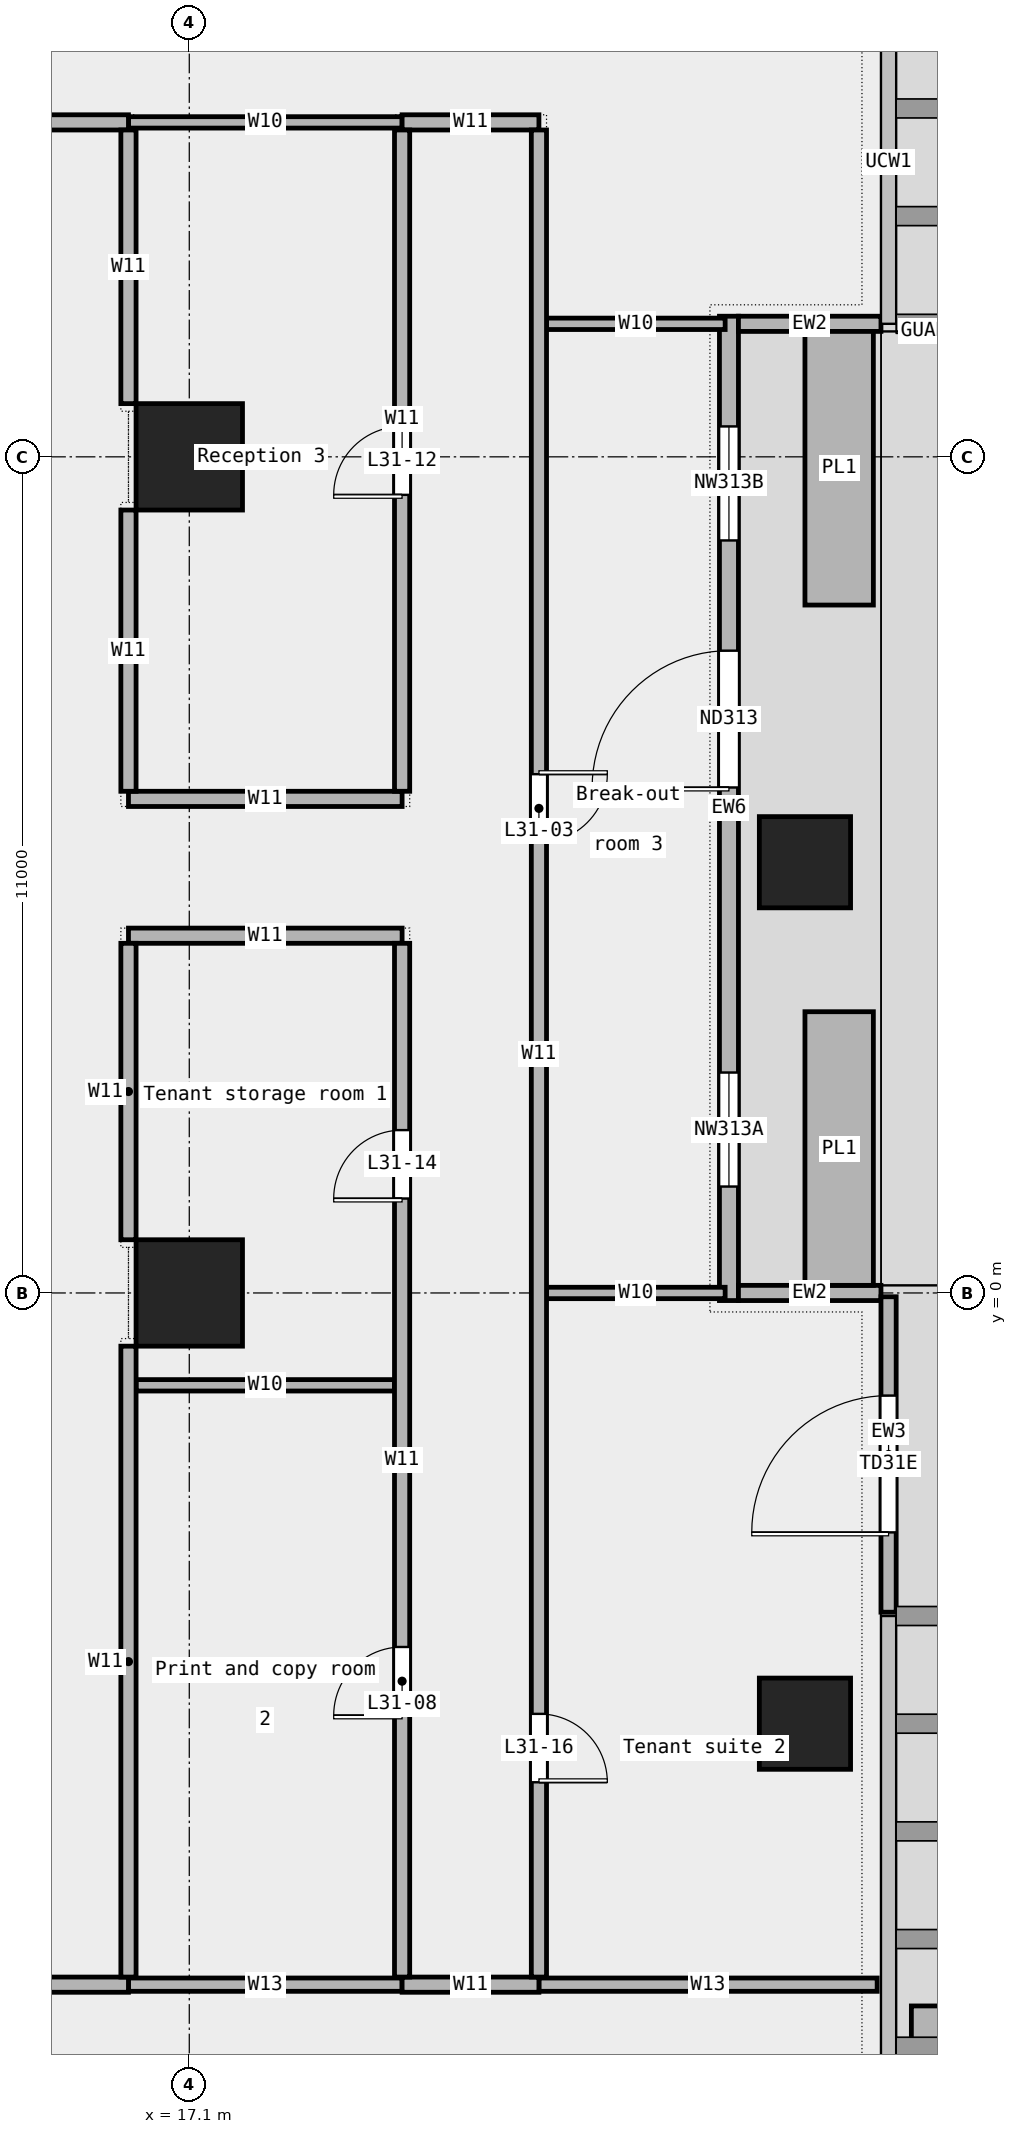
"""IFC4 building model, lengths in metres.
Left out: names, types, materials, properties, quantities, classifications, styles, units other than length and angle.
Written with IfcOpenShell. Run it as: python <this file> out.ifc"""

import sys

from ifc_helpers import new_model, si_unit, direction, frame, frame_2d, origin, origin_2d, place, context, subcontext, project, spatial, rectangle, extrude, element, fill, save


model = new_model("IFC4")
c1 = context("Model", 3, precision=1e-05, world=origin(), true_north=direction((0.0, 1.0)))
c2 = subcontext(c1, "Body", "Model", "MODEL_VIEW")
j1 = project(units=[si_unit("LENGTHUNIT", "METRE"), si_unit("PLANEANGLEUNIT", "RADIAN")], contexts=[c1])
p1 = place(None, origin())
s1 = spatial("IfcSite", under=j1, at=p1, CompositionType="ELEMENT")
p2 = place(p1, origin())
s2 = spatial("IfcBuilding", under=s1, at=p2, CompositionType="ELEMENT")
p3 = place(p2, frame((0.0, 0.0, 157.0)))
s3 = spatial("IfcBuildingStorey", under=s2, at=p3, CompositionType="ELEMENT", Elevation=157.0)
for number, where, z_axis, x_axis in (
    (1, (25.2, -5.667, 0.0), (0.0, 0.0, 1.0), (1.0, 0.0, 0.0)),
    (2, (25.2, 5.667, 0.0), (0.0, 0.0, 1.0), (1.0, 0.0, 0.0)),
):
    element("IfcColumn", number, at=place(p3, frame(where, z_axis=z_axis, x_axis=x_axis)), inside=s3, PredefinedType="COLUMN", context=c2, shape_type="SweptSolid", body=[
        extrude(rectangle(XDim=1.2, YDim=1.2, at=origin_2d()), origin(), (0.0, 0.0, 1.0), 3.6),
    ])
for number, where, z_axis, x_axis in (
    (3, (17.1, 0.0, 0.0), (0.0, 0.0, 1.0), (1.0, 0.0, 0.0)),
    (4, (17.1, 11.0, 0.0), (0.0, 0.0, 1.0), (1.0, 0.0, 0.0)),
):
    element("IfcColumn", number, at=place(p3, frame(where, z_axis=z_axis, x_axis=x_axis)), inside=s3, PredefinedType="COLUMN", context=c2, shape_type="SweptSolid", body=[
        extrude(rectangle(XDim=1.4, YDim=1.4, at=origin_2d()), origin(), (0.0, 0.0, 1.0), 3.6),
    ])
p4 = place(p3, frame((24.2, -0.1, 0.0), z_axis=(0.0, 0.0, 1.0), x_axis=(0.0, 1.0, 0.0)))
e5 = element("IfcWall", 5, at=p4, inside=s3, PredefinedType="STANDARD", context=c2, shape_type="SweptSolid", body=[
    extrude(rectangle(XDim=12.95, YDim=0.25, at=frame_2d((6.475, 0.0))), origin(), (0.0, 0.0, 1.0), 3.6),
])
p5 = place(p4, frame((1.5, 0.0, 0.45)))
e6 = element("IfcOpeningElement", 6, at=p5, cuts=e5, PredefinedType="OPENING", context=c2, shape_type="SweptSolid", body=[
    extrude(rectangle(XDim=1.5, YDim=2.4, at=frame_2d((0.75, 1.2))), frame((0.0, 0.137, 0.0), z_axis=(0.0, -1.0, 0.0), x_axis=(1.0, 0.0, 0.0)), (0.0, 0.0, 1.0), 0.274),
])
p6 = place(p4, frame((6.75, 0.0, 0.0)))
e7 = element("IfcOpeningElement", 7, at=p6, cuts=e5, PredefinedType="OPENING", context=c2, shape_type="SweptSolid", body=[
    extrude(rectangle(XDim=1.8, YDim=2.4, at=frame_2d((0.9, 1.2))), frame((0.0, 0.137, 0.0), z_axis=(0.0, -1.0, 0.0), x_axis=(1.0, 0.0, 0.0)), (0.0, 0.0, 1.0), 0.274),
])
p7 = place(p4, frame((10.0, 0.0, 0.45)))
e8 = element("IfcOpeningElement", 8, at=p7, cuts=e5, PredefinedType="OPENING", context=c2, shape_type="SweptSolid", body=[
    extrude(rectangle(XDim=1.5, YDim=2.4, at=frame_2d((0.75, 1.2))), frame((0.0, 0.137, 0.0), z_axis=(0.0, -1.0, 0.0), x_axis=(1.0, 0.0, 0.0)), (0.0, 0.0, 1.0), 0.274),
])
for number, where, z_axis, x_axis in (
    (9, (26.2, 0.0, 0.0), (0.0, 0.0, 1.0), (-1.0, 0.0, 0.0)),
    (10, (26.2, 12.75, 0.0), (0.0, 0.0, 1.0), (-1.0, 0.0, 0.0)),
):
    element("IfcWall", number, at=place(p3, frame(where, z_axis=z_axis, x_axis=x_axis)), inside=s3, PredefinedType="STANDARD", context=c2, shape_type="SweptSolid", body=[
        extrude(rectangle(XDim=1.875, YDim=0.2, at=frame_2d((0.938, 0.0))), origin(), (0.0, 0.0, 1.0), 3.6),
    ])
for number, where, z_axis, x_axis in (
    (11, (25.65, 0.1, 0.0), (0.0, 0.0, 1.0), (0.0, 1.0, 0.0)),
    (12, (25.65, 9.05, 0.0), (0.0, 0.0, 1.0), (0.0, 1.0, 0.0)),
):
    element("IfcWall", number, at=place(p3, frame(where, z_axis=z_axis, x_axis=x_axis)), inside=s3, PredefinedType="STANDARD", context=c2, shape_type="SweptSolid", body=[
        extrude(rectangle(XDim=3.6, YDim=0.9, at=frame_2d((1.8, 0.0))), origin(), (0.0, 0.0, 1.0), 0.7),
    ])
p8 = place(p3, frame((26.3, -4.2, 0.0), z_axis=(0.0, 0.0, 1.0), x_axis=(0.0, 1.0, 0.0)))
e13 = element("IfcWall", 13, at=p8, inside=s3, PredefinedType="STANDARD", context=c2, shape_type="SweptSolid", body=[
    extrude(rectangle(XDim=4.15, YDim=0.2, at=frame_2d((2.075, 0.0))), origin(), (0.0, 0.0, 1.0), 3.6),
])
p9 = place(p8, frame((1.05, 0.0, 0.0)))
e14 = element("IfcOpeningElement", 14, at=p9, cuts=e13, PredefinedType="OPENING", context=c2, shape_type="SweptSolid", body=[
    extrude(rectangle(XDim=1.8, YDim=2.4, at=frame_2d((0.9, 1.2))), frame((0.0, 0.112, 0.0), z_axis=(0.0, -1.0, 0.0), x_axis=(1.0, 0.0, 0.0)), (0.0, 0.0, 1.0), 0.224),
])
p10 = place(p3, frame((26.9, -12.38, 0.0), z_axis=(0.0, 0.0, 1.0), x_axis=(0.0, 1.0, 0.0)))
e15 = element("IfcWall", 15, at=p10, inside=s3, PredefinedType="STANDARD", context=c2, shape_type="SweptSolid", body=[
    extrude(rectangle(XDim=3.0, YDim=0.6, at=frame_2d((1.5, 0.0))), origin(), (0.0, 0.0, 1.0), 0.7),
])
p11 = place(p3, frame((16.3, -9.1, 0.0), z_axis=(0.0, 0.0, 1.0), x_axis=(1.0, 0.0, 0.0)))
e16 = element("IfcWall", 16, at=p11, inside=s3, PredefinedType="PARTITIONING", context=c2, shape_type="SweptSolid", body=[
    extrude(rectangle(XDim=3.6, YDim=0.175, at=frame_2d((1.8, 0.0))), origin(), (0.0, 0.0, 1.0), 3.6),
])
p12 = place(p3, frame((21.7, -9.1, 0.0), z_axis=(0.0, 0.0, 1.0), x_axis=(1.0, 0.0, 0.0)))
e17 = element("IfcWall", 17, at=p12, inside=s3, PredefinedType="PARTITIONING", context=c2, shape_type="SweptSolid", body=[
    extrude(rectangle(XDim=4.45, YDim=0.175, at=frame_2d((2.225, 0.0))), origin(), (0.0, 0.0, 1.0), 3.6),
])
p13 = place(p3, frame((-9.48, -9.1, 0.0), z_axis=(0.0, 0.0, 1.0), x_axis=(1.0, 0.0, 0.0)))
e18 = element("IfcWall", 18, at=p13, inside=s3, PredefinedType="PARTITIONING", context=c2, shape_type="SweptSolid", body=[
    extrude(rectangle(XDim=25.78, YDim=0.2, at=frame_2d((12.89, 0.0))), origin(), (0.0, 0.0, 1.0), 3.6),
])
p14 = place(p3, frame((19.9, -9.1, 0.0), z_axis=(0.0, 0.0, 1.0), x_axis=(1.0, 0.0, 0.0)))
e19 = element("IfcWall", 19, at=p14, inside=s3, PredefinedType="PARTITIONING", context=c2, shape_type="SweptSolid", body=[
    extrude(rectangle(XDim=1.8, YDim=0.2, at=frame_2d((0.9, 0.0))), origin(), (0.0, 0.0, 1.0), 3.6),
])
p15 = place(p3, frame((16.4, -1.215, 0.0), z_axis=(0.0, 0.0, 1.0), x_axis=(1.0, 0.0, 0.0)))
e20 = element("IfcWall", 20, at=p15, inside=s3, PredefinedType="PARTITIONING", context=c2, shape_type="SweptSolid", body=[
    extrude(rectangle(XDim=3.4, YDim=0.15, at=frame_2d((1.7, 0.0))), origin(), (0.0, 0.0, 1.0), 3.6),
])
p16 = place(p3, frame((21.8, 0.0, 0.0), z_axis=(0.0, 0.0, 1.0), x_axis=(1.0, 0.0, 0.0)))
e21 = element("IfcWall", 21, at=p16, inside=s3, PredefinedType="PARTITIONING", context=c2, shape_type="SweptSolid", body=[
    extrude(rectangle(XDim=2.35, YDim=0.15, at=frame_2d((1.175, 0.0))), origin(), (0.0, 0.0, 1.0), 3.6),
])
for number, where, z_axis, x_axis in (
    (22, (16.3, 4.7, 0.0), (0.0, 0.0, 1.0), (1.0, 0.0, 0.0)),
    (23, (16.3, 6.5, 0.0), (0.0, 0.0, 1.0), (1.0, 0.0, 0.0)),
):
    element("IfcWall", number, at=place(p3, frame(where, z_axis=z_axis, x_axis=x_axis)), inside=s3, PredefinedType="PARTITIONING", context=c2, shape_type="SweptSolid", body=[
        extrude(rectangle(XDim=3.6, YDim=0.2, at=frame_2d((1.8, 0.0))), origin(), (0.0, 0.0, 1.0), 3.6),
    ])
p17 = place(p3, frame((21.8, 12.75, 0.0), z_axis=(0.0, 0.0, 1.0), x_axis=(1.0, 0.0, 0.0)))
e24 = element("IfcWall", 24, at=p17, inside=s3, PredefinedType="PARTITIONING", context=c2, shape_type="SweptSolid", body=[
    extrude(rectangle(XDim=2.35, YDim=0.15, at=frame_2d((1.175, 0.0))), origin(), (0.0, 0.0, 1.0), 3.6),
])
p18 = place(p3, frame((16.3, 15.4, 0.0), z_axis=(0.0, 0.0, 1.0), x_axis=(1.0, 0.0, 0.0)))
e25 = element("IfcWall", 25, at=p18, inside=s3, PredefinedType="PARTITIONING", context=c2, shape_type="SweptSolid", body=[
    extrude(rectangle(XDim=3.6, YDim=0.15, at=frame_2d((1.8, 0.0))), origin(), (0.0, 0.0, 1.0), 3.6),
])
p19 = place(p3, frame((-16.3, 15.4, 0.0), z_axis=(0.0, 0.0, 1.0), x_axis=(1.0, 0.0, 0.0)))
e26 = element("IfcWall", 26, at=p19, inside=s3, PredefinedType="PARTITIONING", context=c2, shape_type="SweptSolid", body=[
    extrude(rectangle(XDim=32.6, YDim=0.2, at=frame_2d((16.3, 0.0))), origin(), (0.0, 0.0, 1.0), 3.6),
])
p20 = place(p19, frame((24.992, 0.0, 0.0)))
e27 = element("IfcOpeningElement", 27, at=p20, cuts=e26, PredefinedType="OPENING", context=c2, shape_type="SweptSolid", body=[
    extrude(rectangle(XDim=1.8, YDim=2.1, at=frame_2d((0.9, 1.05))), frame((0.0, 0.112, 0.0), z_axis=(0.0, -1.0, 0.0), x_axis=(1.0, 0.0, 0.0)), (0.0, 0.0, 1.0), 0.224),
])
p21 = place(p19, frame((9.635, 0.0, 0.0)))
e28 = element("IfcOpeningElement", 28, at=p21, cuts=e26, PredefinedType="OPENING", context=c2, shape_type="SweptSolid", body=[
    extrude(rectangle(XDim=1.8, YDim=2.1, at=frame_2d((0.9, 1.05))), frame((0.0, 0.112, 0.0), z_axis=(0.0, -1.0, 0.0), x_axis=(1.0, 0.0, 0.0)), (0.0, 0.0, 1.0), 0.224),
])
p22 = place(p3, frame((19.9, 15.4, 0.0), z_axis=(0.0, 0.0, 1.0), x_axis=(1.0, 0.0, 0.0)))
e29 = element("IfcWall", 29, at=p22, inside=s3, PredefinedType="PARTITIONING", context=c2, shape_type="SweptSolid", body=[
    extrude(rectangle(XDim=1.8, YDim=0.2, at=frame_2d((0.9, 0.0))), origin(), (0.0, 0.0, 1.0), 3.6),
])
p23 = place(p3, frame((16.3, -9.0, 0.0), z_axis=(0.0, 0.0, 1.0), x_axis=(0.0, 1.0, 0.0)))
e30 = element("IfcWall", 30, at=p23, inside=s3, PredefinedType="PARTITIONING", context=c2, shape_type="SweptSolid", body=[
    extrude(rectangle(XDim=8.3, YDim=0.2, at=frame_2d((4.15, 0.0))), origin(), (0.0, 0.0, 1.0), 3.6),
])
p24 = place(p3, frame((16.3, 0.7, 0.0), z_axis=(0.0, 0.0, 1.0), x_axis=(0.0, 1.0, 0.0)))
e31 = element("IfcWall", 31, at=p24, inside=s3, PredefinedType="PARTITIONING", context=c2, shape_type="SweptSolid", body=[
    extrude(rectangle(XDim=3.9, YDim=0.2, at=frame_2d((1.95, 0.0))), origin(), (0.0, 0.0, 1.0), 3.6),
])
p25 = place(p3, frame((16.3, 6.6, 0.0), z_axis=(0.0, 0.0, 1.0), x_axis=(0.0, 1.0, 0.0)))
e32 = element("IfcWall", 32, at=p25, inside=s3, PredefinedType="PARTITIONING", context=c2, shape_type="SweptSolid", body=[
    extrude(rectangle(XDim=3.7, YDim=0.2, at=frame_2d((1.85, 0.0))), origin(), (0.0, 0.0, 1.0), 3.6),
])
p26 = place(p3, frame((16.3, 11.7, 0.0), z_axis=(0.0, 0.0, 1.0), x_axis=(0.0, 1.0, 0.0)))
e33 = element("IfcWall", 33, at=p26, inside=s3, PredefinedType="PARTITIONING", context=c2, shape_type="SweptSolid", body=[
    extrude(rectangle(XDim=3.6, YDim=0.2, at=frame_2d((1.8, 0.0))), origin(), (0.0, 0.0, 1.0), 3.6),
])
p27 = place(p3, frame((19.9, -9.0, 0.0), z_axis=(0.0, 0.0, 1.0), x_axis=(0.0, 1.0, 0.0)))
e34 = element("IfcWall", 34, at=p27, inside=s3, PredefinedType="PARTITIONING", context=c2, shape_type="SweptSolid", body=[
    extrude(rectangle(XDim=13.6, YDim=0.2, at=frame_2d((6.8, 0.0))), origin(), (0.0, 0.0, 1.0), 3.6),
])
p28 = place(p27, frame((3.442, 0.0, 0.0)))
e35 = element("IfcOpeningElement", 35, at=p28, cuts=e34, PredefinedType="OPENING", context=c2, shape_type="SweptSolid", body=[
    extrude(rectangle(XDim=0.9, YDim=2.1, at=frame_2d((0.45, 1.05))), frame((0.0, 0.112, 0.0), z_axis=(0.0, -1.0, 0.0), x_axis=(1.0, 0.0, 0.0)), (0.0, 0.0, 1.0), 0.224),
])
p29 = place(p27, frame((10.242, 0.0, 0.0)))
e36 = element("IfcOpeningElement", 36, at=p29, cuts=e34, PredefinedType="OPENING", context=c2, shape_type="SweptSolid", body=[
    extrude(rectangle(XDim=0.9, YDim=2.1, at=frame_2d((0.45, 1.05))), frame((0.0, 0.112, 0.0), z_axis=(0.0, -1.0, 0.0), x_axis=(1.0, 0.0, 0.0)), (0.0, 0.0, 1.0), 0.224),
])
p30 = place(p3, frame((19.9, 6.6, 0.0), z_axis=(0.0, 0.0, 1.0), x_axis=(0.0, 1.0, 0.0)))
e37 = element("IfcWall", 37, at=p30, inside=s3, PredefinedType="PARTITIONING", context=c2, shape_type="SweptSolid", body=[
    extrude(rectangle(XDim=8.7, YDim=0.2, at=frame_2d((4.35, 0.0))), origin(), (0.0, 0.0, 1.0), 3.6),
])
p31 = place(p30, frame((3.9, 0.0, 0.0)))
e38 = element("IfcOpeningElement", 38, at=p31, cuts=e37, PredefinedType="OPENING", context=c2, shape_type="SweptSolid", body=[
    extrude(rectangle(XDim=0.9, YDim=2.1, at=frame_2d((0.45, 1.05))), frame((0.0, 0.112, 0.0), z_axis=(0.0, -1.0, 0.0), x_axis=(1.0, 0.0, 0.0)), (0.0, 0.0, 1.0), 0.224),
])
p32 = place(p3, frame((21.7, -9.0, 0.0), z_axis=(0.0, 0.0, 1.0), x_axis=(0.0, 1.0, 0.0)))
e39 = element("IfcWall", 39, at=p32, inside=s3, PredefinedType="PARTITIONING", context=c2, shape_type="SweptSolid", body=[
    extrude(rectangle(XDim=24.3, YDim=0.2, at=frame_2d((12.15, 0.0))), origin(), (0.0, 0.0, 1.0), 3.6),
])
p33 = place(p32, frame((14.925, 0.0, 0.0)))
e40 = element("IfcOpeningElement", 40, at=p33, cuts=e39, PredefinedType="OPENING", context=c2, shape_type="SweptSolid", body=[
    extrude(rectangle(XDim=0.9, YDim=2.1, at=frame_2d((0.45, 1.05))), frame((0.0, 0.112, 0.0), z_axis=(0.0, -1.0, 0.0), x_axis=(1.0, 0.0, 0.0)), (0.0, 0.0, 1.0), 0.224),
])
p34 = place(p32, frame((2.562, 0.0, 0.0)))
e41 = element("IfcOpeningElement", 41, at=p34, cuts=e39, PredefinedType="OPENING", context=c2, shape_type="SweptSolid", body=[
    extrude(rectangle(XDim=0.9, YDim=2.1, at=frame_2d((0.45, 1.05))), frame((0.0, 0.112, 0.0), z_axis=(0.0, -1.0, 0.0), x_axis=(1.0, 0.0, 0.0)), (0.0, 0.0, 1.0), 0.224),
])
p35 = place(p5, origin())
e42 = element("IfcWindow", 42, at=p35, inside=s3, PartitioningType="SINGLE_PANEL", PredefinedType="WINDOW", context=c2, shape_type="SweptSolid", body=[
    extrude(rectangle(XDim=1.5, YDim=2.4, at=frame_2d((0.75, 1.2))), frame((0.0, 0.03, 0.0), z_axis=(0.0, -1.0, 0.0), x_axis=(1.0, 0.0, 0.0)), (0.0, 0.0, 1.0), 0.06),
])
fill(e6, e42)
p36 = place(p6, origin())
e43 = element("IfcDoor", 43, at=p36, inside=s3, OperationType="DOUBLE_DOOR_SINGLE_SWING", PredefinedType="DOOR", context=c2, shape_type="SweptSolid", body=[
    extrude(rectangle(XDim=1.8, YDim=2.4, at=frame_2d((0.9, 1.2))), frame((0.0, 0.025, 0.0), z_axis=(0.0, -1.0, 0.0), x_axis=(1.0, 0.0, 0.0)), (0.0, 0.0, 1.0), 0.05),
])
fill(e7, e43)
p37 = place(p7, origin())
e44 = element("IfcWindow", 44, at=p37, inside=s3, PartitioningType="SINGLE_PANEL", PredefinedType="WINDOW", context=c2, shape_type="SweptSolid", body=[
    extrude(rectangle(XDim=1.5, YDim=2.4, at=frame_2d((0.75, 1.2))), frame((0.0, 0.03, 0.0), z_axis=(0.0, -1.0, 0.0), x_axis=(1.0, 0.0, 0.0)), (0.0, 0.0, 1.0), 0.06),
])
fill(e8, e44)
p38 = place(p9, origin())
e45 = element("IfcDoor", 45, at=p38, inside=s3, OperationType="DOUBLE_DOOR_SINGLE_SWING", PredefinedType="DOOR", context=c2, shape_type="SweptSolid", body=[
    extrude(rectangle(XDim=1.8, YDim=2.4, at=frame_2d((0.9, 1.2))), frame((0.0, 0.025, 0.0), z_axis=(0.0, -1.0, 0.0), x_axis=(1.0, 0.0, 0.0)), (0.0, 0.0, 1.0), 0.05),
])
fill(e14, e45)
p39 = place(p33, origin())
e46 = element("IfcDoor", 46, at=p39, inside=s3, OperationType="SINGLE_SWING_LEFT", PredefinedType="DOOR", context=c2, shape_type="SweptSolid", body=[
    extrude(rectangle(XDim=0.9, YDim=2.1, at=frame_2d((0.45, 1.05))), frame((0.0, 0.025, 0.0), z_axis=(0.0, -1.0, 0.0), x_axis=(1.0, 0.0, 0.0)), (0.0, 0.0, 1.0), 0.05),
])
fill(e40, e46)
p40 = place(p28, origin())
e47 = element("IfcDoor", 47, at=p40, inside=s3, OperationType="SINGLE_SWING_LEFT", PredefinedType="DOOR", context=c2, shape_type="SweptSolid", body=[
    extrude(rectangle(XDim=0.9, YDim=2.1, at=frame_2d((0.45, 1.05))), frame((0.0, 0.025, 0.0), z_axis=(0.0, -1.0, 0.0), x_axis=(1.0, 0.0, 0.0)), (0.0, 0.0, 1.0), 0.05),
])
fill(e35, e47)
p41 = place(p31, origin())
e48 = element("IfcDoor", 48, at=p41, inside=s3, OperationType="SINGLE_SWING_LEFT", PredefinedType="DOOR", context=c2, shape_type="SweptSolid", body=[
    extrude(rectangle(XDim=0.9, YDim=2.1, at=frame_2d((0.45, 1.05))), frame((0.0, 0.025, 0.0), z_axis=(0.0, -1.0, 0.0), x_axis=(1.0, 0.0, 0.0)), (0.0, 0.0, 1.0), 0.05),
])
fill(e38, e48)
p42 = place(p29, origin())
e49 = element("IfcDoor", 49, at=p42, inside=s3, OperationType="SINGLE_SWING_LEFT", PredefinedType="DOOR", context=c2, shape_type="SweptSolid", body=[
    extrude(rectangle(XDim=0.9, YDim=2.1, at=frame_2d((0.45, 1.05))), frame((0.0, 0.025, 0.0), z_axis=(0.0, -1.0, 0.0), x_axis=(1.0, 0.0, 0.0)), (0.0, 0.0, 1.0), 0.05),
])
fill(e36, e49)
p43 = place(p34, origin())
e50 = element("IfcDoor", 50, at=p43, inside=s3, OperationType="SINGLE_SWING_RIGHT", PredefinedType="DOOR", context=c2, shape_type="SweptSolid", body=[
    extrude(rectangle(XDim=0.9, YDim=2.1, at=frame_2d((0.45, 1.05))), frame((0.0, 0.025, 0.0), z_axis=(0.0, -1.0, 0.0), x_axis=(1.0, 0.0, 0.0)), (0.0, 0.0, 1.0), 0.05),
])
fill(e41, e50)
save(model, sys.argv[1])
